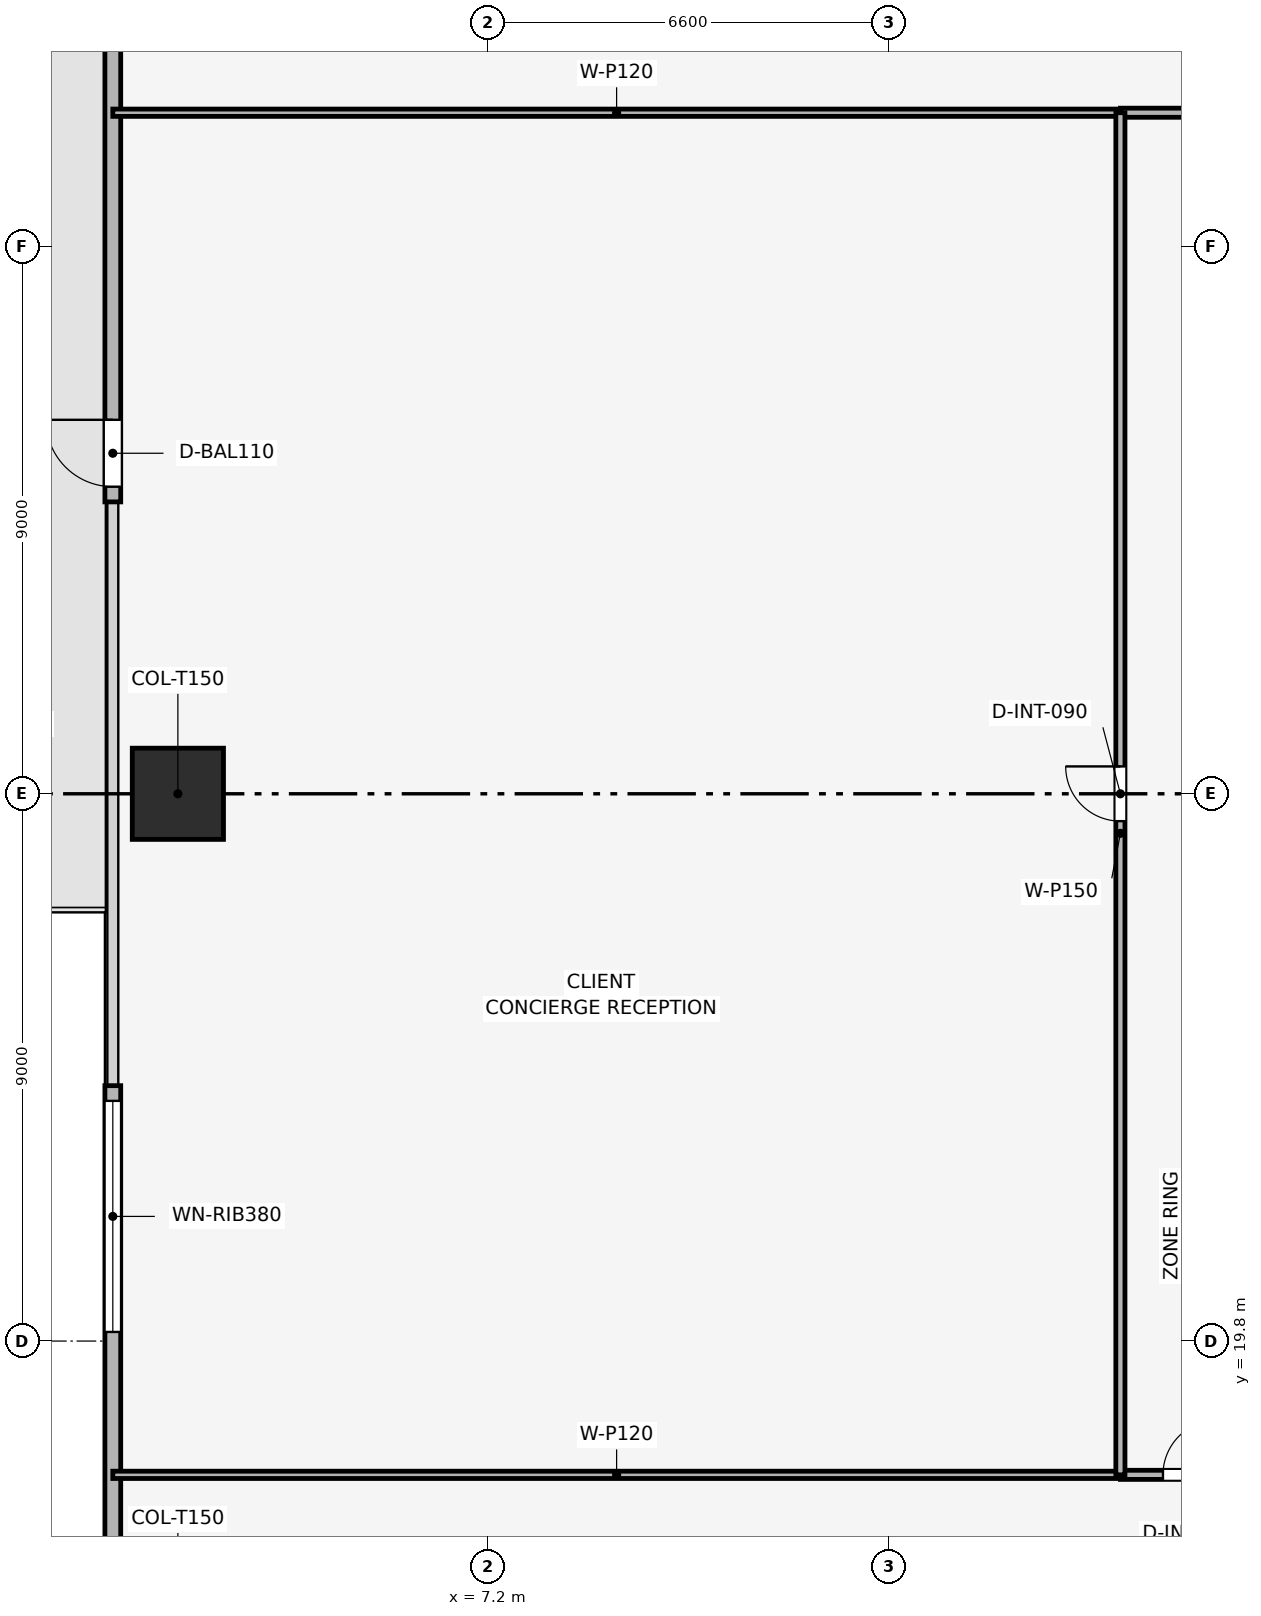
"""IFC4 building model, lengths in metres.
Left out: names, types, materials, properties, quantities, classifications, styles, units other than length and angle.
Written with IfcOpenShell. Run it as: python <this file> out.ifc"""

import sys

from ifc_helpers import new_model, si_unit, direction, frame, frame_2d, origin, origin_2d, place, context, subcontext, project, spatial, rectangle, extrude, element, fill, save


model = new_model("IFC4")
c1 = context("Model", 3, precision=1e-05, world=origin(), true_north=direction((0.0, 1.0)))
c2 = subcontext(c1, "Body", "Model", "MODEL_VIEW")
j1 = project(units=[si_unit("LENGTHUNIT", "METRE"), si_unit("PLANEANGLEUNIT", "RADIAN")], contexts=[c1])
p1 = place(None, origin())
s1 = spatial("IfcSite", under=j1, at=p1, CompositionType="ELEMENT")
p2 = place(p1, origin())
s2 = spatial("IfcBuilding", under=s1, at=p2, CompositionType="ELEMENT")
p3 = place(p2, frame((0.0, 0.0, 41.7)))
s3 = spatial("IfcBuildingStorey", under=s2, at=p3, CompositionType="ELEMENT", Elevation=41.7)
p4 = place(p3, frame((2.1, 28.8, 0.003), z_axis=(0.0, 0.0, 1.0), x_axis=(1.0, 0.0, 0.0)))
e1 = element("IfcColumn", 1, at=p4, inside=s3, PredefinedType="COLUMN", context=c2, shape_type="SweptSolid", body=[
    extrude(rectangle(XDim=1.5, YDim=1.5, at=origin_2d()), origin(), (0.0, 0.0, 1.0), 3.644),
])
p5 = place(p3, frame((1.03, 8.7, 0.0), z_axis=(0.0, 0.0, 1.0), x_axis=(0.0, 1.0, 0.0)))
e2 = element("IfcWall", 2, at=p5, inside=s3, PredefinedType="SOLIDWALL", context=c2, shape_type="SweptSolid", body=[
    extrude(rectangle(XDim=15.3, YDim=0.26, at=frame_2d((7.65, 0.0))), origin(), (0.0, 0.0, 1.0), 3.65),
])
p6 = place(p5, frame((11.25, 0.0, 0.9)))
e3 = element("IfcOpeningElement", 3, at=p6, cuts=e2, PredefinedType="OPENING", context=c2, shape_type="SweptSolid", body=[
    extrude(rectangle(XDim=3.8, YDim=1.9, at=frame_2d((1.9, 0.95))), frame((0.0, 0.14, 0.0), z_axis=(0.0, -1.0, 0.0), x_axis=(1.0, 0.0, 0.0)), (0.0, 0.0, 1.0), 0.28),
])
p7 = place(p3, frame((1.03, 33.6, 0.0), z_axis=(0.0, 0.0, 1.0), x_axis=(0.0, 1.0, 0.0)))
e4 = element("IfcWall", 4, at=p7, inside=s3, PredefinedType="SOLIDWALL", context=c2, shape_type="SweptSolid", body=[
    extrude(rectangle(XDim=15.3, YDim=0.26, at=frame_2d((7.65, 0.0))), origin(), (0.0, 0.0, 1.0), 3.65),
])
p8 = place(p7, frame((0.25, 0.0, 0.0)))
e5 = element("IfcOpeningElement", 5, at=p8, cuts=e4, PredefinedType="OPENING", context=c2, shape_type="SweptSolid", body=[
    extrude(rectangle(XDim=1.1, YDim=2.2, at=frame_2d((0.55, 1.1))), frame((0.0, 0.14, 0.0), z_axis=(0.0, -1.0, 0.0), x_axis=(1.0, 0.0, 0.0)), (0.0, 0.0, 1.0), 0.28),
])
for number, where, z_axis, x_axis in (
    (6, (1.03, 17.6, 0.0), (0.0, 0.0, 1.0), (1.0, 0.0, 0.0)),
    (7, (1.03, 40.0, 0.0), (0.0, 0.0, 1.0), (1.0, 0.0, 0.0)),
):
    element("IfcWall", number, at=place(p3, frame(where, z_axis=z_axis, x_axis=x_axis)), inside=s3, PredefinedType="PARTITIONING", context=c2, shape_type="SweptSolid", body=[
        extrude(rectangle(XDim=16.57, YDim=0.12, at=frame_2d((8.285, 0.0))), origin(), (0.0, 0.0, 1.0), 2.935),
    ])
p9 = place(p3, frame((17.6, 17.6, 0.0), z_axis=(0.0, 0.0, 1.0), x_axis=(1.0, 0.0, 0.0)))
e8 = element("IfcWall", 8, at=p9, inside=s3, PredefinedType="PARTITIONING", context=c2, shape_type="SweptSolid", body=[
    extrude(rectangle(XDim=22.4, YDim=0.15, at=frame_2d((11.2, 0.0))), origin(), (0.0, 0.0, 1.0), 3.085),
])
p10 = place(p9, frame((0.7, 0.0, 0.0)))
e9 = element("IfcOpeningElement", 9, at=p10, cuts=e8, PredefinedType="OPENING", context=c2, shape_type="SweptSolid", body=[
    extrude(rectangle(XDim=0.9, YDim=2.1, at=frame_2d((0.45, 1.05))), frame((0.0, 0.085, 0.0), z_axis=(0.0, -1.0, 0.0), x_axis=(1.0, 0.0, 0.0)), (0.0, 0.0, 1.0), 0.17),
])
p11 = place(p9, frame((4.94, 0.0, 0.0)))
e10 = element("IfcOpeningElement", 10, at=p11, cuts=e8, PredefinedType="OPENING", context=c2, shape_type="SweptSolid", body=[
    extrude(rectangle(XDim=0.9, YDim=2.1, at=frame_2d((0.45, 1.05))), frame((0.0, 0.085, 0.0), z_axis=(0.0, -1.0, 0.0), x_axis=(1.0, 0.0, 0.0)), (0.0, 0.0, 1.0), 0.17),
])
p12 = place(p9, frame((10.912, 0.0, 0.0)))
e11 = element("IfcOpeningElement", 11, at=p12, cuts=e8, PredefinedType="OPENING", context=c2, shape_type="SweptSolid", body=[
    extrude(rectangle(XDim=0.9, YDim=2.1, at=frame_2d((0.45, 1.05))), frame((0.0, 0.085, 0.0), z_axis=(0.0, -1.0, 0.0), x_axis=(1.0, 0.0, 0.0)), (0.0, 0.0, 1.0), 0.17),
])
p13 = place(p9, frame((17.872, 0.0, 0.0)))
e12 = element("IfcOpeningElement", 12, at=p13, cuts=e8, PredefinedType="OPENING", context=c2, shape_type="SweptSolid", body=[
    extrude(rectangle(XDim=0.9, YDim=2.1, at=frame_2d((0.45, 1.05))), frame((0.0, 0.085, 0.0), z_axis=(0.0, -1.0, 0.0), x_axis=(1.0, 0.0, 0.0)), (0.0, 0.0, 1.0), 0.17),
])
p14 = place(p3, frame((17.6, 40.0, 0.0), z_axis=(0.0, 0.0, 1.0), x_axis=(1.0, 0.0, 0.0)))
e13 = element("IfcWall", 13, at=p14, inside=s3, PredefinedType="PARTITIONING", context=c2, shape_type="SweptSolid", body=[
    extrude(rectangle(XDim=22.4, YDim=0.15, at=frame_2d((11.2, 0.0))), origin(), (0.0, 0.0, 1.0), 3.085),
])
p15 = place(p14, frame((1.95, 0.0, 0.0)))
e14 = element("IfcOpeningElement", 14, at=p15, cuts=e13, PredefinedType="OPENING", context=c2, shape_type="SweptSolid", body=[
    extrude(rectangle(XDim=0.9, YDim=2.1, at=frame_2d((0.45, 1.05))), frame((0.0, 0.085, 0.0), z_axis=(0.0, -1.0, 0.0), x_axis=(1.0, 0.0, 0.0)), (0.0, 0.0, 1.0), 0.17),
])
p16 = place(p14, frame((5.75, 0.0, 0.0)))
e15 = element("IfcOpeningElement", 15, at=p16, cuts=e13, PredefinedType="OPENING", context=c2, shape_type="SweptSolid", body=[
    extrude(rectangle(XDim=0.9, YDim=2.1, at=frame_2d((0.45, 1.05))), frame((0.0, 0.085, 0.0), z_axis=(0.0, -1.0, 0.0), x_axis=(1.0, 0.0, 0.0)), (0.0, 0.0, 1.0), 0.17),
])
p17 = place(p14, frame((8.65, 0.0, 0.0)))
e16 = element("IfcOpeningElement", 16, at=p17, cuts=e13, PredefinedType="OPENING", context=c2, shape_type="SweptSolid", body=[
    extrude(rectangle(XDim=0.9, YDim=2.1, at=frame_2d((0.45, 1.05))), frame((0.0, 0.085, 0.0), z_axis=(0.0, -1.0, 0.0), x_axis=(1.0, 0.0, 0.0)), (0.0, 0.0, 1.0), 0.17),
])
p18 = place(p14, frame((11.4, 0.0, 0.0)))
e17 = element("IfcOpeningElement", 17, at=p18, cuts=e13, PredefinedType="OPENING", context=c2, shape_type="SweptSolid", body=[
    extrude(rectangle(XDim=0.95, YDim=2.1, at=frame_2d((0.475, 1.05))), frame((0.0, 0.085, 0.0), z_axis=(0.0, -1.0, 0.0), x_axis=(1.0, 0.0, 0.0)), (0.0, 0.0, 1.0), 0.17),
])
p19 = place(p14, frame((17.35, 0.0, 0.0)))
e18 = element("IfcOpeningElement", 18, at=p19, cuts=e13, PredefinedType="OPENING", context=c2, shape_type="SweptSolid", body=[
    extrude(rectangle(XDim=0.9, YDim=2.1, at=frame_2d((0.45, 1.05))), frame((0.0, 0.085, 0.0), z_axis=(0.0, -1.0, 0.0), x_axis=(1.0, 0.0, 0.0)), (0.0, 0.0, 1.0), 0.17),
])
p20 = place(p3, frame((17.6, 17.6, 0.0), z_axis=(0.0, 0.0, 1.0), x_axis=(0.0, 1.0, 0.0)))
e19 = element("IfcWall", 19, at=p20, inside=s3, PredefinedType="PARTITIONING", context=c2, shape_type="SweptSolid", body=[
    extrude(rectangle(XDim=22.4, YDim=0.15, at=frame_2d((11.2, 0.0))), origin(), (0.0, 0.0, 1.0), 3.085),
])
p21 = place(p20, frame((10.75, 0.0, 0.0)))
e20 = element("IfcOpeningElement", 20, at=p21, cuts=e19, PredefinedType="OPENING", context=c2, shape_type="SweptSolid", body=[
    extrude(rectangle(XDim=0.9, YDim=2.1, at=frame_2d((0.45, 1.05))), frame((0.0, 0.085, 0.0), z_axis=(0.0, -1.0, 0.0), x_axis=(1.0, 0.0, 0.0)), (0.0, 0.0, 1.0), 0.17),
])
p22 = place(p8, origin())
e21 = element("IfcDoor", 21, at=p22, inside=s3, OperationType="SINGLE_SWING_RIGHT", PredefinedType="DOOR", context=c2, shape_type="SweptSolid", body=[
    extrude(rectangle(XDim=1.1, YDim=2.2, at=frame_2d((0.55, 1.1))), frame((0.0, 0.025, 0.0), z_axis=(0.0, -1.0, 0.0), x_axis=(1.0, 0.0, 0.0)), (0.0, 0.0, 1.0), 0.05),
])
fill(e5, e21)
p23 = place(p6, origin())
e22 = element("IfcWindow", 22, at=p23, inside=s3, PartitioningType="SINGLE_PANEL", PredefinedType="WINDOW", context=c2, shape_type="SweptSolid", body=[
    extrude(rectangle(XDim=3.8, YDim=1.9, at=frame_2d((1.9, 0.95))), frame((0.0, 0.03, 0.0), z_axis=(0.0, -1.0, 0.0), x_axis=(1.0, 0.0, 0.0)), (0.0, 0.0, 1.0), 0.06),
])
fill(e3, e22)
p24 = place(p10, origin())
e23 = element("IfcDoor", 23, at=p24, inside=s3, OperationType="SINGLE_SWING_RIGHT", PredefinedType="DOOR", context=c2, shape_type="SweptSolid", body=[
    extrude(rectangle(XDim=0.9, YDim=2.1, at=frame_2d((0.45, 1.05))), frame((0.0, 0.025, 0.0), z_axis=(0.0, -1.0, 0.0), x_axis=(1.0, 0.0, 0.0)), (0.0, 0.0, 1.0), 0.05),
])
fill(e9, e23)
p25 = place(p21, origin())
e24 = element("IfcDoor", 24, at=p25, inside=s3, OperationType="SINGLE_SWING_RIGHT", PredefinedType="DOOR", context=c2, shape_type="SweptSolid", body=[
    extrude(rectangle(XDim=0.9, YDim=2.1, at=frame_2d((0.45, 1.05))), frame((0.0, 0.025, 0.0), z_axis=(0.0, -1.0, 0.0), x_axis=(1.0, 0.0, 0.0)), (0.0, 0.0, 1.0), 0.05),
])
fill(e20, e24)
save(model, sys.argv[1])
